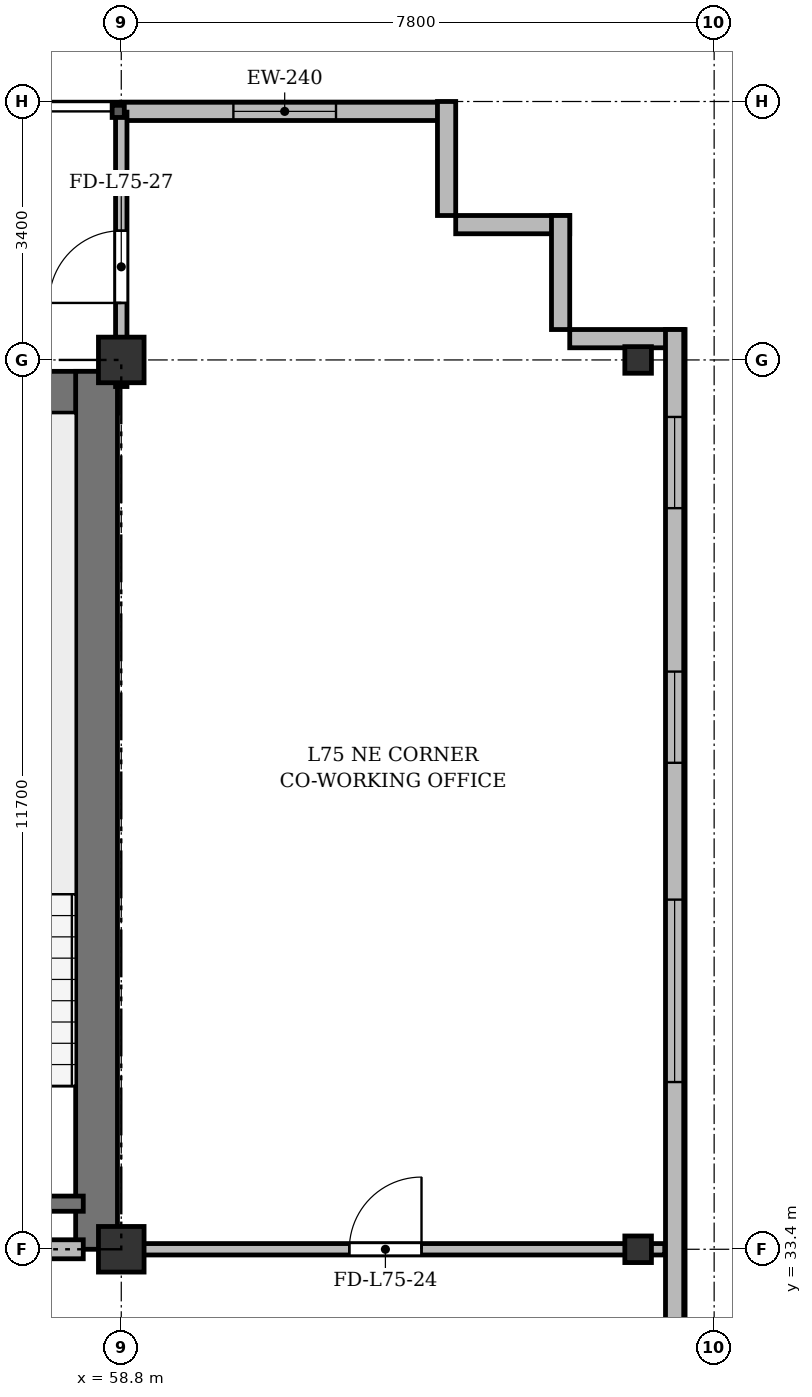
"""IFC4 building model, lengths in metres.
Left out: names, types, materials, properties, quantities, classifications, styles, units other than length and angle.
Written with IfcOpenShell. Run it as: python <this file> out.ifc"""

import sys

from ifc_helpers import new_model, si_unit, direction, frame, frame_2d, origin, origin_2d, place, context, subcontext, project, spatial, rectangle, i_section, extrude, source, transform, mapped, element, fill, save


model = new_model("IFC4")
c1 = context("Model", 3, precision=1e-05, world=origin(), true_north=direction((0.0, 1.0)))
c2 = subcontext(c1, "Body", "Model", "MODEL_VIEW")
j1 = project(units=[si_unit("LENGTHUNIT", "METRE"), si_unit("PLANEANGLEUNIT", "RADIAN")], contexts=[c1])
p1 = place(None, origin())
s1 = spatial("IfcSite", under=j1, at=p1, CompositionType="ELEMENT")
p2 = place(p1, origin())
s2 = spatial("IfcBuilding", under=s1, at=p2, CompositionType="ELEMENT")
p3 = place(p2, frame((0.0, 0.0, 288.3)))
s3 = spatial("IfcBuildingStorey", under=s2, at=p3, CompositionType="ELEMENT", Elevation=288.3)
m1 = source(origin(), c2, "Body", "SweptSolid", [
    extrude(rectangle(XDim=0.6, YDim=0.6, at=origin_2d()), origin(), (0.0, 0.0, 1.0), 3.6),
])
for number, where, z_axis, x_axis in (
    (1, (58.8, 33.4, 0.0), (0.0, 0.0, 1.0), (1.0, 0.0, 0.0)),
    (2, (58.8, 45.1, 0.0), (0.0, 0.0, 1.0), (1.0, 0.0, 0.0)),
):
    element("IfcColumn", number, at=place(p3, frame(where, z_axis=z_axis, x_axis=x_axis)), inside=s3, PredefinedType="COLUMN", context=c2, shape_type="MappedRepresentation", body=[
        mapped(m1, transform((0.0, 0.0, 0.0), x_axis=(1.0, 0.0, 0.0), y_axis=(0.0, 1.0, 0.0), z_axis=(0.0, 0.0, 1.0), scale=1.0)),
    ])
m2 = source(origin(), c2, "Body", "SweptSolid", [
    extrude(i_section(OverallWidth=0.35, OverallDepth=0.35, WebThickness=0.018, FlangeThickness=0.028, at=origin_2d()), origin(), (0.0, 0.0, 1.0), 3.6),
])
for number, where, z_axis, x_axis in (
    (3, (65.6, 33.4, 0.0), (0.0, 0.0, 1.0), (1.0, 0.0, 0.0)),
    (4, (65.6, 45.1, 0.0), (0.0, 0.0, 1.0), (1.0, 0.0, 0.0)),
):
    element("IfcColumn", number, at=place(p3, frame(where, z_axis=z_axis, x_axis=x_axis)), inside=s3, PredefinedType="COLUMN", context=c2, shape_type="MappedRepresentation", body=[
        mapped(m2, transform((0.0, 0.0, 0.0), x_axis=(1.0, 0.0, 0.0), y_axis=(0.0, 1.0, 0.0), z_axis=(0.0, 0.0, 1.0), scale=1.0)),
    ])
p4 = place(p3, frame((58.8, 48.37, 0.0), z_axis=(0.0, 0.0, 1.0), x_axis=(1.0, 0.0, 0.0)))
e5 = element("IfcWall", 5, at=p4, inside=s3, PredefinedType="SOLIDWALL", context=c2, shape_type="SweptSolid", body=[
    extrude(rectangle(XDim=4.3, YDim=0.24, at=frame_2d((2.15, 0.0))), origin(), (0.0, 0.0, 1.0), 3.37),
])
p5 = place(p4, frame((1.475, 0.0, 0.9)))
e6 = element("IfcOpeningElement", 6, at=p5, cuts=e5, PredefinedType="OPENING", context=c2, shape_type="SweptSolid", body=[
    extrude(rectangle(XDim=1.35, YDim=1.5, at=frame_2d((0.675, 0.75))), frame((0.0, 0.13, 0.0), z_axis=(0.0, -1.0, 0.0), x_axis=(1.0, 0.0, 0.0)), (0.0, 0.0, 1.0), 0.26),
])
for number, where, z_axis, x_axis in (
    (7, (63.08, 48.5, 0.0), (0.0, 0.0, 1.0), (0.0, -1.0, 0.0)),
    (8, (63.2, 46.88, 0.0), (0.0, 0.0, 1.0), (1.0, 0.0, 0.0)),
    (9, (64.58, 47.0, 0.0), (0.0, 0.0, 1.0), (0.0, -1.0, 0.0)),
    (10, (64.7, 45.38, 0.0), (0.0, 0.0, 1.0), (1.0, 0.0, 0.0)),
):
    element("IfcWall", number, at=place(p3, frame(where, z_axis=z_axis, x_axis=x_axis)), inside=s3, PredefinedType="SOLIDWALL", context=c2, shape_type="SweptSolid", body=[
        extrude(rectangle(XDim=1.5, YDim=0.24, at=frame_2d((0.75, 0.0))), origin(), (0.0, 0.0, 1.0), 3.37),
    ])
p6 = place(p3, frame((66.08, 45.5, 0.0), z_axis=(0.0, 0.0, 1.0), x_axis=(0.0, -1.0, 0.0)))
e11 = element("IfcWall", 11, at=p6, inside=s3, PredefinedType="SOLIDWALL", context=c2, shape_type="SweptSolid", body=[
    extrude(rectangle(XDim=39.0, YDim=0.24, at=frame_2d((19.5, 0.0))), origin(), (0.0, 0.0, 1.0), 3.37),
])
p7 = place(p6, frame((36.35, 0.0, 0.92)))
e12 = element("IfcOpeningElement", 12, at=p7, cuts=e11, PredefinedType="OPENING", context=c2, shape_type="SweptSolid", body=[
    extrude(rectangle(XDim=1.2, YDim=1.65, at=frame_2d((0.6, 0.825))), frame((0.0, 0.13, 0.0), z_axis=(0.0, -1.0, 0.0), x_axis=(1.0, 0.0, 0.0)), (0.0, 0.0, 1.0), 0.26),
])
p8 = place(p6, frame((32.9, 0.0, 0.92)))
e13 = element("IfcOpeningElement", 13, at=p8, cuts=e11, PredefinedType="OPENING", context=c2, shape_type="SweptSolid", body=[
    extrude(rectangle(XDim=2.4, YDim=2.1, at=frame_2d((1.2, 1.05))), frame((0.0, 0.13, 0.0), z_axis=(0.0, -1.0, 0.0), x_axis=(1.0, 0.0, 0.0)), (0.0, 0.0, 1.0), 0.26),
])
p9 = place(p6, frame((28.7, 0.0, 0.92)))
e14 = element("IfcOpeningElement", 14, at=p9, cuts=e11, PredefinedType="OPENING", context=c2, shape_type="SweptSolid", body=[
    extrude(rectangle(XDim=2.4, YDim=2.1, at=frame_2d((1.2, 1.05))), frame((0.0, 0.13, 0.0), z_axis=(0.0, -1.0, 0.0), x_axis=(1.0, 0.0, 0.0)), (0.0, 0.0, 1.0), 0.26),
])
p10 = place(p6, frame((21.5, 0.0, 0.92)))
e15 = element("IfcOpeningElement", 15, at=p10, cuts=e11, PredefinedType="OPENING", context=c2, shape_type="SweptSolid", body=[
    extrude(rectangle(XDim=2.4, YDim=2.1, at=frame_2d((1.2, 1.05))), frame((0.0, 0.13, 0.0), z_axis=(0.0, -1.0, 0.0), x_axis=(1.0, 0.0, 0.0)), (0.0, 0.0, 1.0), 0.26),
])
p11 = place(p6, frame((7.5, 0.0, 0.92)))
e16 = element("IfcOpeningElement", 16, at=p11, cuts=e11, PredefinedType="OPENING", context=c2, shape_type="SweptSolid", body=[
    extrude(rectangle(XDim=2.4, YDim=2.1, at=frame_2d((1.2, 1.05))), frame((0.0, 0.13, 0.0), z_axis=(0.0, -1.0, 0.0), x_axis=(1.0, 0.0, 0.0)), (0.0, 0.0, 1.0), 0.26),
])
p12 = place(p6, frame((4.5, 0.0, 0.92)))
e17 = element("IfcOpeningElement", 17, at=p12, cuts=e11, PredefinedType="OPENING", context=c2, shape_type="SweptSolid", body=[
    extrude(rectangle(XDim=1.2, YDim=1.65, at=frame_2d((0.6, 0.825))), frame((0.0, 0.13, 0.0), z_axis=(0.0, -1.0, 0.0), x_axis=(1.0, 0.0, 0.0)), (0.0, 0.0, 1.0), 0.26),
])
p13 = place(p6, frame((1.15, 0.0, 0.92)))
e18 = element("IfcOpeningElement", 18, at=p13, cuts=e11, PredefinedType="OPENING", context=c2, shape_type="SweptSolid", body=[
    extrude(rectangle(XDim=1.2, YDim=1.65, at=frame_2d((0.6, 0.825))), frame((0.0, 0.13, 0.0), z_axis=(0.0, -1.0, 0.0), x_axis=(1.0, 0.0, 0.0)), (0.0, 0.0, 1.0), 0.26),
])
p14 = place(p3, frame((15.65, 44.675, 0.0), z_axis=(0.0, 0.0, 1.0), x_axis=(1.0, 0.0, 0.0)))
e19 = element("IfcWall", 19, at=p14, inside=s3, PredefinedType="SHEAR", context=c2, shape_type="SweptSolid", body=[
    extrude(rectangle(XDim=43.1, YDim=0.55, at=frame_2d((21.55, 0.0))), origin(), (0.0, 0.0, 1.0), 3.37),
])
p15 = place(p3, frame((58.475, 33.4, 0.0), z_axis=(0.0, 0.0, 1.0), x_axis=(0.0, 1.0, 0.0)))
e20 = element("IfcWall", 20, at=p15, inside=s3, PredefinedType="SHEAR", context=c2, shape_type="SweptSolid", body=[
    extrude(rectangle(XDim=11.55, YDim=0.55, at=frame_2d((5.775, 0.0))), origin(), (0.0, 0.0, 1.0), 3.37),
])
p16 = place(p3, frame((54.9, 34.0, 0.0), z_axis=(0.0, 0.0, 1.0), x_axis=(1.0, 0.0, 0.0)))
e21 = element("IfcWall", 21, at=p16, inside=s3, PredefinedType="SHEAR", context=c2, shape_type="SweptSolid", body=[
    extrude(rectangle(XDim=3.4, YDim=0.2, at=frame_2d((1.7, 0.0))), origin(), (0.0, 0.0, 1.0), 3.37),
])
p17 = place(p3, frame((47.15, 33.4, 0.0), z_axis=(0.0, 0.0, 1.0), x_axis=(1.0, 0.0, 0.0)))
e22 = element("IfcWall", 22, at=p17, inside=s3, PredefinedType="PARTITIONING", context=c2, shape_type="SweptSolid", body=[
    extrude(rectangle(XDim=11.15, YDim=0.25, at=frame_2d((5.575, 0.0))), origin(), (0.0, 0.0, 1.0), 2.92),
])
p18 = place(p17, frame((0.7, 0.0, 0.0)))
e23 = element("IfcOpeningElement", 23, at=p18, cuts=e22, PredefinedType="OPENING", context=c2, shape_type="SweptSolid", body=[
    extrude(rectangle(XDim=0.95, YDim=2.15, at=frame_2d((0.475, 1.075))), frame((0.0, 0.135, 0.0), z_axis=(0.0, -1.0, 0.0), x_axis=(1.0, 0.0, 0.0)), (0.0, 0.0, 1.0), 0.27),
])
p19 = place(p17, frame((6.0, 0.0, 0.0)))
e24 = element("IfcOpeningElement", 24, at=p19, cuts=e22, PredefinedType="OPENING", context=c2, shape_type="SweptSolid", body=[
    extrude(rectangle(XDim=1.2, YDim=2.15, at=frame_2d((0.6, 1.075))), frame((0.0, 0.135, 0.0), z_axis=(0.0, -1.0, 0.0), x_axis=(1.0, 0.0, 0.0)), (0.0, 0.0, 1.0), 0.27),
])
p20 = place(p3, frame((58.8, 33.4, 0.0), z_axis=(0.0, 0.0, 1.0), x_axis=(1.0, 0.0, 0.0)))
e25 = element("IfcWall", 25, at=p20, inside=s3, PredefinedType="PARTITIONING", context=c2, shape_type="SweptSolid", body=[
    extrude(rectangle(XDim=7.15, YDim=0.15, at=frame_2d((3.575, 0.0))), origin(), (0.0, 0.0, 1.0), 2.92),
])
p21 = place(p20, frame((3.0, 0.0, 0.0)))
e26 = element("IfcOpeningElement", 26, at=p21, cuts=e25, PredefinedType="OPENING", context=c2, shape_type="SweptSolid", body=[
    extrude(rectangle(XDim=0.95, YDim=2.15, at=frame_2d((0.475, 1.075))), frame((0.0, 0.085, 0.0), z_axis=(0.0, -1.0, 0.0), x_axis=(1.0, 0.0, 0.0)), (0.0, 0.0, 1.0), 0.17),
])
p22 = place(p3, frame((58.8, 44.75, 0.0), z_axis=(0.0, 0.0, 1.0), x_axis=(0.0, 1.0, 0.0)))
e27 = element("IfcWall", 27, at=p22, inside=s3, PredefinedType="PARTITIONING", context=c2, shape_type="SweptSolid", body=[
    extrude(rectangle(XDim=3.61, YDim=0.15, at=frame_2d((1.805, 0.0))), origin(), (0.0, 0.0, 1.0), 2.87),
])
p23 = place(p22, frame((1.1, 0.0, 0.0)))
e28 = element("IfcOpeningElement", 28, at=p23, cuts=e27, PredefinedType="OPENING", context=c2, shape_type="SweptSolid", body=[
    extrude(rectangle(XDim=0.95, YDim=2.15, at=frame_2d((0.475, 1.075))), frame((0.0, 0.085, 0.0), z_axis=(0.0, -1.0, 0.0), x_axis=(1.0, 0.0, 0.0)), (0.0, 0.0, 1.0), 0.17),
])
m3 = source(origin(), c2, "Body", "SweptSolid", [
    extrude(rectangle(XDim=1.35, YDim=1.5, at=frame_2d((0.675, 0.75))), frame((0.0, 0.03, 0.0), z_axis=(0.0, -1.0, 0.0), x_axis=(1.0, 0.0, 0.0)), (0.0, 0.0, 1.0), 0.06),
])
p24 = place(p5, origin())
e29 = element("IfcWindow", 29, at=p24, inside=s3, PartitioningType="SINGLE_PANEL", PredefinedType="WINDOW", context=c2, shape_type="MappedRepresentation", body=[
    mapped(m3, transform((0.0, 0.0, 0.0), x_axis=(1.0, 0.0, 0.0), y_axis=(0.0, 1.0, 0.0), z_axis=(0.0, 0.0, 1.0), scale=1.0)),
])
fill(e6, e29)
m4 = source(origin(), c2, "Body", "SweptSolid", [
    extrude(rectangle(XDim=2.4, YDim=2.1, at=frame_2d((1.2, 1.05))), frame((0.0, 0.03, 0.0), z_axis=(0.0, -1.0, 0.0), x_axis=(1.0, 0.0, 0.0)), (0.0, 0.0, 1.0), 0.06),
])
p25 = place(p11, origin())
e30 = element("IfcWindow", 30, at=p25, inside=s3, PartitioningType="SINGLE_PANEL", PredefinedType="WINDOW", context=c2, shape_type="MappedRepresentation", body=[
    mapped(m4, transform((0.0, 0.0, 0.0), x_axis=(1.0, 0.0, 0.0), y_axis=(0.0, 1.0, 0.0), z_axis=(0.0, 0.0, 1.0), scale=1.0)),
])
fill(e16, e30)
m5 = source(origin(), c2, "Body", "SweptSolid", [
    extrude(rectangle(XDim=1.2, YDim=1.65, at=frame_2d((0.6, 0.825))), frame((0.0, 0.03, 0.0), z_axis=(0.0, -1.0, 0.0), x_axis=(1.0, 0.0, 0.0)), (0.0, 0.0, 1.0), 0.06),
])
p26 = place(p12, origin())
e31 = element("IfcWindow", 31, at=p26, inside=s3, PartitioningType="SINGLE_PANEL", PredefinedType="WINDOW", context=c2, shape_type="MappedRepresentation", body=[
    mapped(m5, transform((0.0, 0.0, 0.0), x_axis=(1.0, 0.0, 0.0), y_axis=(0.0, 1.0, 0.0), z_axis=(0.0, 0.0, 1.0), scale=1.0)),
])
fill(e17, e31)
p27 = place(p13, origin())
e32 = element("IfcWindow", 32, at=p27, inside=s3, PartitioningType="SINGLE_PANEL", PredefinedType="WINDOW", context=c2, shape_type="MappedRepresentation", body=[
    mapped(m5, transform((0.0, 0.0, 0.0), x_axis=(1.0, 0.0, 0.0), y_axis=(0.0, 1.0, 0.0), z_axis=(0.0, 0.0, 1.0), scale=1.0)),
])
fill(e18, e32)
m6 = source(origin(), c2, "Body", "SweptSolid", [
    extrude(rectangle(XDim=0.95, YDim=2.15, at=frame_2d((0.475, 1.075))), frame((0.0, 0.025, 0.0), z_axis=(0.0, -1.0, 0.0), x_axis=(1.0, 0.0, 0.0)), (0.0, 0.0, 1.0), 0.05),
])
p28 = place(p21, origin())
e33 = element("IfcDoor", 33, at=p28, inside=s3, OperationType="SINGLE_SWING_RIGHT", PredefinedType="DOOR", context=c2, shape_type="MappedRepresentation", body=[
    mapped(m6, transform((0.0, 0.0, 0.0), x_axis=(1.0, 0.0, 0.0), y_axis=(0.0, 1.0, 0.0), z_axis=(0.0, 0.0, 1.0), scale=1.0)),
])
fill(e26, e33)
p29 = place(p23, origin())
e34 = element("IfcDoor", 34, at=p29, inside=s3, OperationType="SINGLE_SWING_LEFT", PredefinedType="DOOR", context=c2, shape_type="MappedRepresentation", body=[
    mapped(m6, transform((0.0, 0.0, 0.0), x_axis=(1.0, 0.0, 0.0), y_axis=(0.0, 1.0, 0.0), z_axis=(0.0, 0.0, 1.0), scale=1.0)),
])
fill(e28, e34)
save(model, sys.argv[1])
